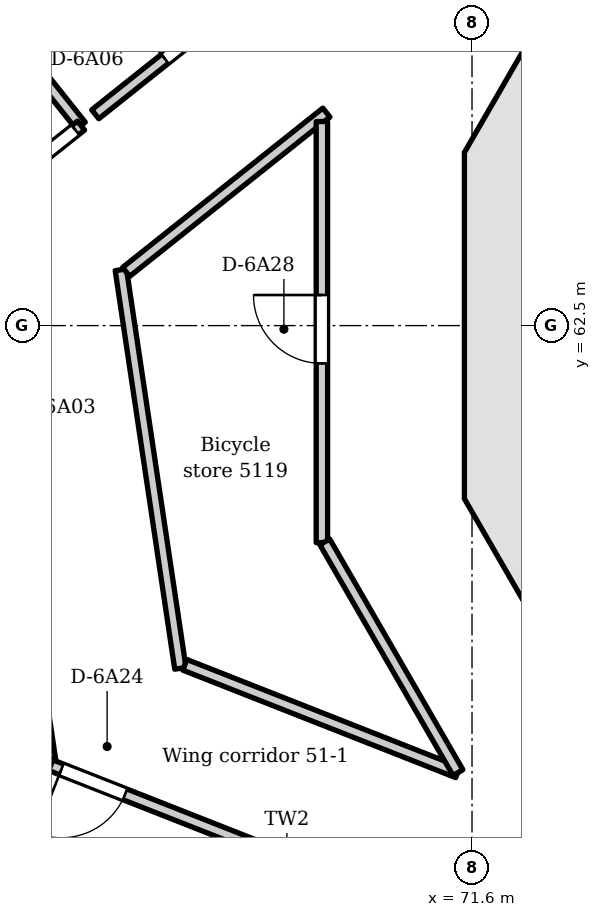
"""IFC4 building model, lengths in metres.
Left out: names, types, materials, properties, quantities, classifications, styles, units other than length and angle.
Written with IfcOpenShell. Run it as: python <this file> out.ifc"""

import sys

from ifc_helpers import new_model, si_unit, direction, frame, frame_2d, origin, place, context, subcontext, project, spatial, polyline, rectangle, outline, extrude, element, fill, save


model = new_model("IFC4")
c1 = context("Model", 3, precision=1e-05, world=origin(), true_north=direction((0.0, 1.0)))
c2 = subcontext(c1, "Body", "Model", "MODEL_VIEW")
j1 = project(units=[si_unit("LENGTHUNIT", "METRE"), si_unit("PLANEANGLEUNIT", "RADIAN")], contexts=[c1])
p1 = place(None, origin())
s1 = spatial("IfcSite", under=j1, at=p1, CompositionType="ELEMENT")
p2 = place(p1, origin())
s2 = spatial("IfcBuilding", under=s1, at=p2, CompositionType="ELEMENT")
p3 = place(p2, frame((0.0, 0.0, 198.0)))
s3 = spatial("IfcBuildingStorey", under=s2, at=p3, CompositionType="ELEMENT", Elevation=198.0)
p4 = place(p3, frame((74.081, 68.548, 0.0), z_axis=(0.0, 0.0, 1.0), x_axis=(-0.499983800959, -0.866034756103, 0.0)))
e1 = element("IfcWall", 1, at=p4, inside=s3, PredefinedType="SHEAR", context=c2, shape_type="SweptSolid", body=[
    extrude(outline(polyline([(0.0, -0.35), (4.555, -0.35), (4.368, 0.35), (0.188, 0.35), (0.0, -0.35)])), origin(), (0.0, 0.0, 1.0), 3.6),
])
p5 = place(p4, frame((1.077, 0.0, 0.0)))
e2 = element("IfcOpeningElement", 2, at=p5, cuts=e1, PredefinedType="OPENING", context=c2, shape_type="SweptSolid", body=[
    extrude(rectangle(XDim=2.4, YDim=2.1, at=frame_2d((1.2, 1.05))), frame((0.0, 0.36, 0.0), z_axis=(0.0, -1.0, 0.0), x_axis=(1.0, 0.0, 0.0)), (0.0, 0.0, 1.0), 0.72),
])
p6 = place(p3, frame((71.85, 64.778, 0.0), z_axis=(0.0, 0.0, 1.0), x_axis=(0.0, -1.0, 0.0)))
e3 = element("IfcWall", 3, at=p6, inside=s3, PredefinedType="SHEAR", context=c2, shape_type="SweptSolid", body=[
    extrude(outline(polyline([(0.0, -0.35), (4.555, -0.35), (4.368, 0.35), (0.188, 0.35), (0.0, -0.35)])), origin(), (0.0, 0.0, 1.0), 3.6),
])
p7 = place(p6, frame((2.992, 0.0, 0.0)))
e4 = element("IfcOpeningElement", 4, at=p7, cuts=e3, PredefinedType="OPENING", context=c2, shape_type="SweptSolid", body=[
    extrude(rectangle(XDim=0.9, YDim=2.1, at=frame_2d((0.45, 1.05))), frame((0.0, 0.36, 0.0), z_axis=(0.0, -1.0, 0.0), x_axis=(1.0, 0.0, 0.0)), (0.0, 0.0, 1.0), 0.72),
])
p8 = place(p3, frame((71.803, 60.397, 0.0), z_axis=(0.0, 0.0, 1.0), x_axis=(0.499983800959, -0.866034756103, 0.0)))
e5 = element("IfcWall", 5, at=p8, inside=s3, PredefinedType="SHEAR", context=c2, shape_type="SweptSolid", body=[
    extrude(outline(polyline([(0.0, -0.35), (4.555, -0.35), (4.368, 0.35), (0.188, 0.35), (0.0, -0.35)])), origin(), (0.0, 0.0, 1.0), 3.6),
])
p9 = place(p8, frame((1.577, 0.0, 0.0)))
e6 = element("IfcOpeningElement", 6, at=p9, cuts=e5, PredefinedType="OPENING", context=c2, shape_type="SweptSolid", body=[
    extrude(rectangle(XDim=1.4, YDim=2.1, at=frame_2d((0.7, 1.05))), frame((0.0, 0.36, 0.0), z_axis=(0.0, -1.0, 0.0), x_axis=(1.0, 0.0, 0.0)), (0.0, 0.0, 1.0), 0.72),
])
p10 = place(p3, frame((54.651, 62.686, 0.0), z_axis=(0.0, 0.0, 1.0), x_axis=(0.782609620341, 0.622512796776, 0.0)))
e7 = element("IfcWall", 7, at=p10, inside=s3, PredefinedType="SOLIDWALL", context=c2, shape_type="SweptSolid", body=[
    extrude(outline(polyline([(0.149, 0.075), (0.149, -0.075), (39.297, -0.075), (39.297, 0.075), (0.149, 0.075)])), origin(), (0.0, 0.0, 1.0), 3.3),
])
p11 = place(p10, frame((1.193, 0.0, 0.0)))
e8 = element("IfcOpeningElement", 8, at=p11, cuts=e7, PredefinedType="OPENING", context=c2, shape_type="SweptSolid", body=[
    extrude(rectangle(XDim=1.8, YDim=2.6, at=frame_2d((0.9, 1.3))), frame((0.0, 0.085, 0.0), z_axis=(0.0, -1.0, 0.0), x_axis=(1.0, 0.0, 0.0)), (0.0, 0.0, 1.0), 0.17),
])
p12 = place(p10, frame((4.479, 0.0, 0.0)))
e9 = element("IfcOpeningElement", 9, at=p12, cuts=e7, PredefinedType="OPENING", context=c2, shape_type="SweptSolid", body=[
    extrude(rectangle(XDim=1.8, YDim=2.6, at=frame_2d((0.9, 1.3))), frame((0.0, 0.085, 0.0), z_axis=(0.0, -1.0, 0.0), x_axis=(1.0, 0.0, 0.0)), (0.0, 0.0, 1.0), 0.17),
])
p13 = place(p10, frame((8.065, 0.0, 0.0)))
e10 = element("IfcOpeningElement", 10, at=p13, cuts=e7, PredefinedType="OPENING", context=c2, shape_type="SweptSolid", body=[
    extrude(rectangle(XDim=1.8, YDim=2.6, at=frame_2d((0.9, 1.3))), frame((0.0, 0.085, 0.0), z_axis=(0.0, -1.0, 0.0), x_axis=(1.0, 0.0, 0.0)), (0.0, 0.0, 1.0), 0.17),
])
p14 = place(p10, frame((11.651, 0.0, 0.0)))
e11 = element("IfcOpeningElement", 11, at=p14, cuts=e7, PredefinedType="OPENING", context=c2, shape_type="SweptSolid", body=[
    extrude(rectangle(XDim=1.8, YDim=2.6, at=frame_2d((0.9, 1.3))), frame((0.0, 0.085, 0.0), z_axis=(0.0, -1.0, 0.0), x_axis=(1.0, 0.0, 0.0)), (0.0, 0.0, 1.0), 0.17),
])
p15 = place(p10, frame((15.237, 0.0, 0.0)))
e12 = element("IfcOpeningElement", 12, at=p15, cuts=e7, PredefinedType="OPENING", context=c2, shape_type="SweptSolid", body=[
    extrude(rectangle(XDim=1.8, YDim=2.6, at=frame_2d((0.9, 1.3))), frame((0.0, 0.085, 0.0), z_axis=(0.0, -1.0, 0.0), x_axis=(1.0, 0.0, 0.0)), (0.0, 0.0, 1.0), 0.17),
])
p16 = place(p10, frame((18.823, 0.0, 0.0)))
e13 = element("IfcOpeningElement", 13, at=p16, cuts=e7, PredefinedType="OPENING", context=c2, shape_type="SweptSolid", body=[
    extrude(rectangle(XDim=1.8, YDim=2.6, at=frame_2d((0.9, 1.3))), frame((0.0, 0.085, 0.0), z_axis=(0.0, -1.0, 0.0), x_axis=(1.0, 0.0, 0.0)), (0.0, 0.0, 1.0), 0.17),
])
p17 = place(p10, frame((22.409, 0.0, 0.0)))
e14 = element("IfcOpeningElement", 14, at=p17, cuts=e7, PredefinedType="OPENING", context=c2, shape_type="SweptSolid", body=[
    extrude(rectangle(XDim=1.8, YDim=2.6, at=frame_2d((0.9, 1.3))), frame((0.0, 0.085, 0.0), z_axis=(0.0, -1.0, 0.0), x_axis=(1.0, 0.0, 0.0)), (0.0, 0.0, 1.0), 0.17),
])
p18 = place(p10, frame((25.995, 0.0, 0.0)))
e15 = element("IfcOpeningElement", 15, at=p18, cuts=e7, PredefinedType="OPENING", context=c2, shape_type="SweptSolid", body=[
    extrude(rectangle(XDim=1.8, YDim=2.6, at=frame_2d((0.9, 1.3))), frame((0.0, 0.085, 0.0), z_axis=(0.0, -1.0, 0.0), x_axis=(1.0, 0.0, 0.0)), (0.0, 0.0, 1.0), 0.17),
])
p19 = place(p10, frame((29.581, 0.0, 0.0)))
e16 = element("IfcOpeningElement", 16, at=p19, cuts=e7, PredefinedType="OPENING", context=c2, shape_type="SweptSolid", body=[
    extrude(rectangle(XDim=1.8, YDim=2.6, at=frame_2d((0.9, 1.3))), frame((0.0, 0.085, 0.0), z_axis=(0.0, -1.0, 0.0), x_axis=(1.0, 0.0, 0.0)), (0.0, 0.0, 1.0), 0.17),
])
p20 = place(p10, frame((33.167, 0.0, 0.0)))
e17 = element("IfcOpeningElement", 17, at=p20, cuts=e7, PredefinedType="OPENING", context=c2, shape_type="SweptSolid", body=[
    extrude(rectangle(XDim=1.8, YDim=2.6, at=frame_2d((0.9, 1.3))), frame((0.0, 0.085, 0.0), z_axis=(0.0, -1.0, 0.0), x_axis=(1.0, 0.0, 0.0)), (0.0, 0.0, 1.0), 0.17),
])
p21 = place(p10, frame((36.453, 0.0, 0.0)))
e18 = element("IfcOpeningElement", 18, at=p21, cuts=e7, PredefinedType="OPENING", context=c2, shape_type="SweptSolid", body=[
    extrude(rectangle(XDim=1.8, YDim=2.6, at=frame_2d((0.9, 1.3))), frame((0.0, 0.085, 0.0), z_axis=(0.0, -1.0, 0.0), x_axis=(1.0, 0.0, 0.0)), (0.0, 0.0, 1.0), 0.17),
])
p22 = place(p3, origin())
e19 = element("IfcWall", 19, at=p22, inside=s3, PredefinedType="PARAPET", context=c2, shape_type="SweptSolid", body=[
    extrude(outline(polyline([(75.979, 82.673), (46.956, 66.253), (47.255, 66.077), (74.479, 81.479), (75.979, 82.673)])), origin(), (0.0, 0.0, 1.0), 1.1),
])
p23 = place(p3, frame((63.117, 69.324, 0.0), z_axis=(0.0, 0.0, 1.0), x_axis=(0.622425914019, -0.7826787218, 0.0)))
e20 = element("IfcWall", 20, at=p23, inside=s3, PredefinedType="PARTITIONING", context=c2, shape_type="SweptSolid", body=[
    extrude(rectangle(XDim=5.36, YDim=0.15, at=frame_2d((2.68, 0.0))), origin(), (0.0, 0.0, 1.0), 3.3),
])
p24 = place(p3, frame((64.478, 57.34, 0.0), z_axis=(0.0, 0.0, 1.0), x_axis=(0.930289512217, -0.366826148822, 0.0)))
e21 = element("IfcWall", 21, at=p24, inside=s3, PredefinedType="PARTITIONING", context=c2, shape_type="SweptSolid", body=[
    extrude(rectangle(XDim=1.698, YDim=0.15, at=frame_2d((0.849, 0.0))), origin(), (0.0, 0.0, 1.0), 3.3),
])
p25 = place(p3, frame((64.987, 63.88, 0.0), z_axis=(0.0, 0.0, 1.0), x_axis=(0.147865724858, -0.98900744558, 0.0)))
e22 = element("IfcWall", 22, at=p25, inside=s3, PredefinedType="PARTITIONING", context=c2, shape_type="SweptSolid", body=[
    extrude(rectangle(XDim=7.167, YDim=0.15, at=frame_2d((3.584, 0.0))), origin(), (0.0, 0.0, 1.0), 2.8),
])
p26 = place(p25, frame((0.447, 0.0, 0.0)))
e23 = element("IfcOpeningElement", 23, at=p26, cuts=e22, PredefinedType="OPENING", context=c2, shape_type="SweptSolid", body=[
    extrude(rectangle(XDim=1.8, YDim=2.1, at=frame_2d((0.9, 1.05))), frame((0.0, 0.085, 0.0), z_axis=(0.0, -1.0, 0.0), x_axis=(1.0, 0.0, 0.0)), (0.0, 0.0, 1.0), 0.17),
])
p27 = place(p3, frame((65.601, 64.451, 0.0), z_axis=(0.0, 0.0, 1.0), x_axis=(0.782653002217, 0.622458254119, 0.0)))
e24 = element("IfcWall", 24, at=p27, inside=s3, PredefinedType="PARTITIONING", context=c2, shape_type="SweptSolid", body=[
    extrude(rectangle(XDim=1.093, YDim=0.15, at=frame_2d((0.546, 0.0))), origin(), (0.0, 0.0, 1.0), 3.3),
])
p28 = place(p27, frame((0.198, 0.0, 0.0)))
e25 = element("IfcOpeningElement", 25, at=p28, cuts=e24, PredefinedType="OPENING", context=c2, shape_type="SweptSolid", body=[
    extrude(rectangle(XDim=0.8, YDim=2.1, at=frame_2d((0.4, 1.05))), frame((0.0, 0.085, 0.0), z_axis=(0.0, -1.0, 0.0), x_axis=(1.0, 0.0, 0.0)), (0.0, 0.0, 1.0), 0.17),
])
p29 = place(p3, frame((66.058, 56.717, 0.0), z_axis=(0.0, 0.0, 1.0), x_axis=(0.930458125329, -0.36639824919, 0.0)))
e26 = element("IfcWall", 26, at=p29, inside=s3, PredefinedType="PARTITIONING", context=c2, shape_type="SweptSolid", body=[
    extrude(rectangle(XDim=5.478, YDim=0.15, at=frame_2d((2.739, 0.0))), origin(), (0.0, 0.0, 1.0), 3.3),
])
p30 = place(p29, frame((0.15, 0.0, 0.0)))
e27 = element("IfcOpeningElement", 27, at=p30, cuts=e26, PredefinedType="OPENING", context=c2, shape_type="SweptSolid", body=[
    extrude(rectangle(XDim=0.9, YDim=2.1, at=frame_2d((0.45, 1.05))), frame((0.0, 0.085, 0.0), z_axis=(0.0, -1.0, 0.0), x_axis=(1.0, 0.0, 0.0)), (0.0, 0.0, 1.0), 0.17),
])
p31 = place(p3, frame((66.643, 65.28, 0.0), z_axis=(0.0, 0.0, 1.0), x_axis=(0.782743987557, 0.622343835788, 0.0)))
e28 = element("IfcWall", 28, at=p31, inside=s3, PredefinedType="PARTITIONING", context=c2, shape_type="SweptSolid", body=[
    extrude(rectangle(XDim=3.347, YDim=0.15, at=frame_2d((1.673, 0.0))), origin(), (0.0, 0.0, 1.0), 3.3),
])
p32 = place(p31, frame((1.172, 0.0, 0.0)))
e29 = element("IfcOpeningElement", 29, at=p32, cuts=e28, PredefinedType="OPENING", context=c2, shape_type="SweptSolid", body=[
    extrude(rectangle(XDim=1.0, YDim=2.1, at=frame_2d((0.5, 1.05))), frame((0.0, 0.085, 0.0), z_axis=(0.0, -1.0, 0.0), x_axis=(1.0, 0.0, 0.0)), (0.0, 0.0, 1.0), 0.17),
])
p33 = place(p3, frame((66.98, 63.234, 0.0), z_axis=(0.0, 0.0, 1.0), x_axis=(0.14773017043, -0.989027702719, 0.0)))
e30 = element("IfcWall", 30, at=p33, inside=s3, PredefinedType="PARTITIONING", context=c2, shape_type="SweptSolid", body=[
    extrude(rectangle(XDim=5.302, YDim=0.15, at=frame_2d((2.651, 0.0))), origin(), (0.0, 0.0, 1.0), 2.8),
])
p34 = place(p3, frame((67.05, 63.207, 0.0), z_axis=(0.0, 0.0, 1.0), x_axis=(0.782472540885, 0.622685091166, 0.0)))
e31 = element("IfcWall", 31, at=p34, inside=s3, PredefinedType="PARTITIONING", context=c2, shape_type="SweptSolid", body=[
    extrude(rectangle(XDim=3.366, YDim=0.15, at=frame_2d((1.683, 0.0))), origin(), (0.0, 0.0, 1.0), 3.3),
])
p35 = place(p3, frame((67.822, 58.038, 0.0), z_axis=(0.0, 0.0, 1.0), x_axis=(0.930426693307, -0.366478059892, 0.0)))
e32 = element("IfcWall", 32, at=p35, inside=s3, PredefinedType="PARTITIONING", context=c2, shape_type="SweptSolid", body=[
    extrude(rectangle(XDim=3.86, YDim=0.15, at=frame_2d((1.93, 0.0))), origin(), (0.0, 0.0, 1.0), 3.3),
])
p36 = place(p3, frame((69.625, 59.645, 0.0), z_axis=(0.0, 0.0, 1.0), x_axis=(0.0, 1.0, 0.0)))
e33 = element("IfcWall", 33, at=p36, inside=s3, PredefinedType="PARTITIONING", context=c2, shape_type="SweptSolid", body=[
    extrude(rectangle(XDim=5.54, YDim=0.15, at=frame_2d((2.77, 0.0))), origin(), (0.0, 0.0, 1.0), 2.8),
])
p37 = place(p36, frame((2.357, 0.0, 0.0)))
e34 = element("IfcOpeningElement", 34, at=p37, cuts=e33, PredefinedType="OPENING", context=c2, shape_type="SweptSolid", body=[
    extrude(rectangle(XDim=0.9, YDim=2.1, at=frame_2d((0.45, 1.05))), frame((0.0, 0.085, 0.0), z_axis=(0.0, -1.0, 0.0), x_axis=(1.0, 0.0, 0.0)), (0.0, 0.0, 1.0), 0.17),
])
p38 = place(p3, frame((69.663, 59.655, 0.0), z_axis=(0.0, 0.0, 1.0), x_axis=(0.50005009493, -0.865996479531, 0.0)))
e35 = element("IfcWall", 35, at=p38, inside=s3, PredefinedType="PARTITIONING", context=c2, shape_type="SweptSolid", body=[
    extrude(rectangle(XDim=3.505, YDim=0.15, at=frame_2d((1.752, 0.0))), origin(), (0.0, 0.0, 1.0), 3.3),
])
p39 = place(p28, origin())
e36 = element("IfcDoor", 36, at=p39, inside=s3, OperationType="SINGLE_SWING_RIGHT", PredefinedType="DOOR", context=c2, shape_type="SweptSolid", body=[
    extrude(rectangle(XDim=0.8, YDim=2.1, at=frame_2d((0.4, 1.05))), frame((0.0, 0.025, 0.0), z_axis=(0.0, -1.0, 0.0), x_axis=(1.0, 0.0, 0.0)), (0.0, 0.0, 1.0), 0.05),
])
fill(e25, e36)
p40 = place(p32, origin())
e37 = element("IfcDoor", 37, at=p40, inside=s3, OperationType="SINGLE_SWING_LEFT", PredefinedType="DOOR", context=c2, shape_type="SweptSolid", body=[
    extrude(rectangle(XDim=1.0, YDim=2.1, at=frame_2d((0.5, 1.05))), frame((0.0, 0.025, 0.0), z_axis=(0.0, -1.0, 0.0), x_axis=(1.0, 0.0, 0.0)), (0.0, 0.0, 1.0), 0.05),
])
fill(e29, e37)
p41 = place(p30, frame((0.9, 0.0, 0.0), z_axis=(0.0, 0.0, 1.0), x_axis=(-1.0, 0.0, 0.0)))
e38 = element("IfcDoor", 38, at=p41, inside=s3, OperationType="SINGLE_SWING_RIGHT", PredefinedType="DOOR", context=c2, shape_type="SweptSolid", body=[
    extrude(rectangle(XDim=0.9, YDim=2.1, at=frame_2d((0.45, 1.05))), frame((0.0, 0.025, 0.0), z_axis=(0.0, -1.0, 0.0), x_axis=(1.0, 0.0, 0.0)), (0.0, 0.0, 1.0), 0.05),
])
fill(e27, e38)
p42 = place(p37, origin())
e39 = element("IfcDoor", 39, at=p42, inside=s3, OperationType="SINGLE_SWING_RIGHT", PredefinedType="DOOR", context=c2, shape_type="SweptSolid", body=[
    extrude(rectangle(XDim=0.9, YDim=2.1, at=frame_2d((0.45, 1.05))), frame((0.0, 0.025, 0.0), z_axis=(0.0, -1.0, 0.0), x_axis=(1.0, 0.0, 0.0)), (0.0, 0.0, 1.0), 0.05),
])
fill(e34, e39)
p43 = place(p7, origin())
e40 = element("IfcDoor", 40, at=p43, inside=s3, OperationType="SINGLE_SWING_RIGHT", PredefinedType="DOOR", context=c2, shape_type="SweptSolid", body=[
    extrude(rectangle(XDim=0.9, YDim=2.1, at=frame_2d((0.45, 1.05))), frame((0.0, 0.075, 0.0), z_axis=(0.0, -1.0, 0.0), x_axis=(1.0, 0.0, 0.0)), (0.0, 0.0, 1.0), 0.05),
])
fill(e4, e40)
save(model, sys.argv[1])
